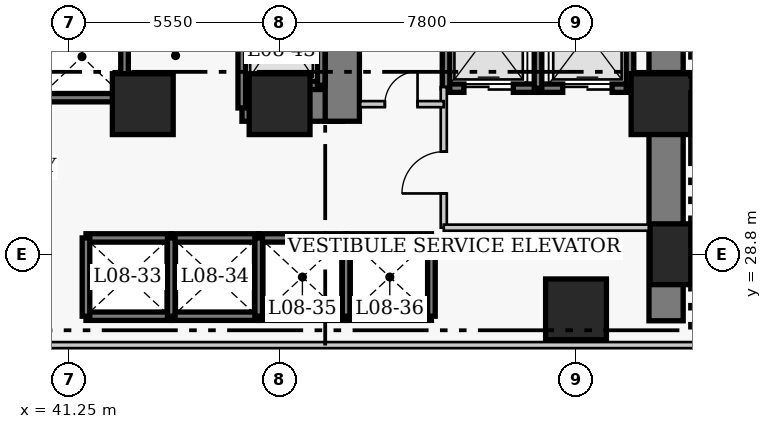
"""IFC4 building model, lengths in metres.
Left out: names, types, materials, properties, quantities, classifications, styles, units other than length and angle.
Written with IfcOpenShell. Run it as: python <this file> out.ifc"""

import sys

from ifc_helpers import new_model, si_unit, direction, frame, frame_2d, origin, origin_2d, place, context, subcontext, project, spatial, rectangle, extrude, element, fill, save


model = new_model("IFC4")
c1 = context("Model", 3, precision=1e-05, world=origin(), true_north=direction((0.0, 1.0)))
c2 = subcontext(c1, "Body", "Model", "MODEL_VIEW")
j1 = project(units=[si_unit("LENGTHUNIT", "METRE"), si_unit("PLANEANGLEUNIT", "RADIAN")], contexts=[c1])
p1 = place(None, origin())
s1 = spatial("IfcSite", under=j1, at=p1, CompositionType="ELEMENT")
p2 = place(p1, origin())
s2 = spatial("IfcBuilding", under=s1, at=p2, CompositionType="ELEMENT")
p3 = place(p2, frame((0.0, 0.0, 37.4)))
s3 = spatial("IfcBuildingStorey", under=s2, at=p3, CompositionType="ELEMENT", Elevation=37.4)
p4 = place(p3, frame((56.97, 27.05, 0.0), z_axis=(0.0, 0.0, 1.0), x_axis=(0.0, 1.0, 0.0)))
e1 = element("IfcWall", 1, at=p4, inside=s3, PredefinedType="SHEAR", context=c2, shape_type="SweptSolid", body=[
    extrude(rectangle(XDim=13.72, YDim=0.9, at=frame_2d((6.86, 0.0))), origin(), (0.0, 0.0, 1.0), 3.8),
])
p5 = place(p3, frame((45.81, 32.75, 0.0), z_axis=(0.0, 0.0, 1.0), x_axis=(1.0, 0.0, 0.0)))
e2 = element("IfcWall", 2, at=p5, inside=s3, PredefinedType="SHEAR", context=c2, shape_type="SweptSolid", body=[
    extrude(rectangle(XDim=2.64, YDim=0.9, at=frame_2d((1.32, 0.0))), origin(), (0.0, 0.0, 1.0), 3.8),
])
p6 = place(p3, frame((48.45, 32.3, 0.0), z_axis=(0.0, 0.0, 1.0), x_axis=(0.0, 1.0, 0.0)))
e3 = element("IfcWall", 3, at=p6, inside=s3, PredefinedType="SHEAR", context=c2, shape_type="SweptSolid", body=[
    extrude(rectangle(XDim=8.02, YDim=0.9, at=frame_2d((4.01, 0.0))), origin(), (0.0, 0.0, 1.0), 3.8),
])
p7 = place(p6, frame((5.9, 0.0, 0.0)))
e4 = element("IfcOpeningElement", 4, at=p7, cuts=e3, PredefinedType="OPENING", context=c2, shape_type="SweptSolid", body=[
    extrude(rectangle(XDim=1.1, YDim=2.15, at=frame_2d((0.55, 1.075))), frame((0.0, 0.46, 0.0), z_axis=(0.0, -1.0, 0.0), x_axis=(1.0, 0.0, 0.0)), (0.0, 0.0, 1.0), 0.92),
])
for number, where, z_axis, x_axis in (
    (5, (57.35, 28.8, 0.0), (0.0, 0.0, 1.0), (1.0, 0.0, 0.0)),
    (6, (43.2, 32.75, 0.0), (0.0, 0.0, 1.0), (1.0, 0.0, 0.0)),
    (7, (46.8, 32.75, 0.0), (0.0, 0.0, 1.0), (1.0, 0.0, 0.0)),
    (8, (54.6, 27.35, 0.0), (0.0, 0.0, 1.0), (1.0, 0.0, 0.0)),
    (9, (56.85, 32.75, 0.0), (0.0, 0.0, 1.0), (1.0, 0.0, 0.0)),
):
    element("IfcColumn", number, at=place(p3, frame(where, z_axis=z_axis, x_axis=x_axis)), inside=s3, PredefinedType="COLUMN", context=c2, shape_type="SweptSolid", body=[
        extrude(rectangle(XDim=1.6, YDim=1.6, at=origin_2d()), origin(), (0.0, 0.0, 1.0), 3.8),
    ])
for number, where, z_axis, x_axis in (
    (10, (41.705, 29.23, 0.0), (0.0, 0.0, 1.0), (1.0, 0.0, 0.0)),
    (11, (41.705, 27.17, 0.0), (0.0, 0.0, 1.0), (1.0, 0.0, 0.0)),
):
    element("IfcWall", number, at=place(p3, frame(where, z_axis=z_axis, x_axis=x_axis)), inside=s3, PredefinedType="SHEAR", context=c2, shape_type="SweptSolid", body=[
        extrude(rectangle(XDim=2.245, YDim=0.22, at=frame_2d((1.123, 0.0))), origin(), (0.0, 0.0, 1.0), 3.8),
    ])
p8 = place(p3, frame((41.705, 27.17, 0.0), z_axis=(0.0, 0.0, 1.0), x_axis=(0.0, 1.0, 0.0)))
e12 = element("IfcWall", 12, at=p8, inside=s3, PredefinedType="SHEAR", context=c2, shape_type="SweptSolid", body=[
    extrude(rectangle(XDim=2.06, YDim=0.2, at=frame_2d((1.03, 0.0))), origin(), (0.0, 0.0, 1.0), 3.8),
])
for number, where, z_axis, x_axis in (
    (13, (43.95, 29.23, 0.0), (0.0, 0.0, 1.0), (1.0, 0.0, 0.0)),
    (14, (43.95, 27.17, 0.0), (0.0, 0.0, 1.0), (1.0, 0.0, 0.0)),
):
    element("IfcWall", number, at=place(p3, frame(where, z_axis=z_axis, x_axis=x_axis)), inside=s3, PredefinedType="SHEAR", context=c2, shape_type="SweptSolid", body=[
        extrude(rectangle(XDim=2.3, YDim=0.22, at=frame_2d((1.15, 0.0))), origin(), (0.0, 0.0, 1.0), 3.8),
    ])
p9 = place(p3, frame((43.95, 27.17, 0.0), z_axis=(0.0, 0.0, 1.0), x_axis=(0.0, 1.0, 0.0)))
e15 = element("IfcWall", 15, at=p9, inside=s3, PredefinedType="SHEAR", context=c2, shape_type="SweptSolid", body=[
    extrude(rectangle(XDim=2.06, YDim=0.2, at=frame_2d((1.03, 0.0))), origin(), (0.0, 0.0, 1.0), 3.8),
])
for number, where, z_axis, x_axis in (
    (16, (46.25, 29.23, 0.0), (0.0, 0.0, 1.0), (1.0, 0.0, 0.0)),
    (17, (46.25, 27.17, 0.0), (0.0, 0.0, 1.0), (1.0, 0.0, 0.0)),
):
    element("IfcWall", number, at=place(p3, frame(where, z_axis=z_axis, x_axis=x_axis)), inside=s3, PredefinedType="SHEAR", context=c2, shape_type="SweptSolid", body=[
        extrude(rectangle(XDim=2.3, YDim=0.22, at=frame_2d((1.15, 0.0))), origin(), (0.0, 0.0, 1.0), 3.8),
    ])
p10 = place(p3, frame((46.25, 27.17, 0.0), z_axis=(0.0, 0.0, 1.0), x_axis=(0.0, 1.0, 0.0)))
e18 = element("IfcWall", 18, at=p10, inside=s3, PredefinedType="SHEAR", context=c2, shape_type="SweptSolid", body=[
    extrude(rectangle(XDim=2.06, YDim=0.2, at=frame_2d((1.03, 0.0))), origin(), (0.0, 0.0, 1.0), 3.8),
])
for number, where, z_axis, x_axis in (
    (19, (48.55, 29.23, 0.0), (0.0, 0.0, 1.0), (1.0, 0.0, 0.0)),
    (20, (48.55, 27.17, 0.0), (0.0, 0.0, 1.0), (1.0, 0.0, 0.0)),
):
    element("IfcWall", number, at=place(p3, frame(where, z_axis=z_axis, x_axis=x_axis)), inside=s3, PredefinedType="SHEAR", context=c2, shape_type="SweptSolid", body=[
        extrude(rectangle(XDim=2.245, YDim=0.22, at=frame_2d((1.123, 0.0))), origin(), (0.0, 0.0, 1.0), 3.8),
    ])
for number, where, z_axis, x_axis in (
    (21, (48.55, 27.17, 0.0), (0.0, 0.0, 1.0), (0.0, 1.0, 0.0)),
    (22, (50.795, 27.17, 0.0), (0.0, 0.0, 1.0), (0.0, 1.0, 0.0)),
):
    element("IfcWall", number, at=place(p3, frame(where, z_axis=z_axis, x_axis=x_axis)), inside=s3, PredefinedType="SHEAR", context=c2, shape_type="SweptSolid", body=[
        extrude(rectangle(XDim=2.06, YDim=0.2, at=frame_2d((1.03, 0.0))), origin(), (0.0, 0.0, 1.0), 3.8),
    ])
p11 = place(p3, frame((40.4, 32.92, 0.0), z_axis=(0.0, 0.0, 1.0), x_axis=(1.0, 0.0, 0.0)))
e23 = element("IfcWall", 23, at=p11, inside=s3, PredefinedType="SHEAR", context=c2, shape_type="SweptSolid", body=[
    extrude(rectangle(XDim=2.32, YDim=0.22, at=frame_2d((1.16, 0.0))), origin(), (0.0, 0.0, 1.0), 3.8),
])
p12 = place(p3, frame((42.72, 32.92, 0.0), z_axis=(0.0, 0.0, 1.0), x_axis=(0.0, 1.0, 0.0)))
e24 = element("IfcWall", 24, at=p12, inside=s3, PredefinedType="SHEAR", context=c2, shape_type="SweptSolid", body=[
    extrude(rectangle(XDim=2.16, YDim=0.2, at=frame_2d((1.08, 0.0))), origin(), (0.0, 0.0, 1.0), 3.8),
])
p13 = place(p3, frame((51.18, 33.17, 0.0), z_axis=(0.0, 0.0, 1.0), x_axis=(1.0, 0.0, 0.0)))
e25 = element("IfcWall", 25, at=p13, inside=s3, PredefinedType="SHEAR", context=c2, shape_type="SweptSolid", body=[
    extrude(rectangle(XDim=2.42, YDim=0.22, at=frame_2d((1.21, 0.0))), origin(), (0.0, 0.0, 1.0), 3.8),
])
p14 = place(p13, frame((0.47, 0.0, 0.0)))
e26 = element("IfcOpeningElement", 26, at=p14, cuts=e25, PredefinedType="OPENING", context=c2, shape_type="SweptSolid", body=[
    extrude(rectangle(XDim=1.3, YDim=2.15, at=frame_2d((0.65, 1.075))), frame((0.0, 0.12, 0.0), z_axis=(0.0, -1.0, 0.0), x_axis=(1.0, 0.0, 0.0)), (0.0, 0.0, 1.0), 0.24),
])
p15 = place(p3, frame((51.18, 33.17, 0.0), z_axis=(0.0, 0.0, 1.0), x_axis=(0.0, 1.0, 0.0)))
e27 = element("IfcWall", 27, at=p15, inside=s3, PredefinedType="SHEAR", context=c2, shape_type="SweptSolid", body=[
    extrude(rectangle(XDim=2.86, YDim=0.2, at=frame_2d((1.43, 0.0))), origin(), (0.0, 0.0, 1.0), 3.8),
])
p16 = place(p3, frame((53.6, 33.17, 0.0), z_axis=(0.0, 0.0, 1.0), x_axis=(1.0, 0.0, 0.0)))
e28 = element("IfcWall", 28, at=p16, inside=s3, PredefinedType="SHEAR", context=c2, shape_type="SweptSolid", body=[
    extrude(rectangle(XDim=2.42, YDim=0.22, at=frame_2d((1.21, 0.0))), origin(), (0.0, 0.0, 1.0), 3.8),
])
p17 = place(p16, frame((0.65, 0.0, 0.0)))
e29 = element("IfcOpeningElement", 29, at=p17, cuts=e28, PredefinedType="OPENING", context=c2, shape_type="SweptSolid", body=[
    extrude(rectangle(XDim=1.3, YDim=2.15, at=frame_2d((0.65, 1.075))), frame((0.0, 0.12, 0.0), z_axis=(0.0, -1.0, 0.0), x_axis=(1.0, 0.0, 0.0)), (0.0, 0.0, 1.0), 0.24),
])
for number, where, z_axis, x_axis in (
    (30, (53.6, 33.17, 0.0), (0.0, 0.0, 1.0), (0.0, 1.0, 0.0)),
    (31, (56.02, 33.17, 0.0), (0.0, 0.0, 1.0), (0.0, 1.0, 0.0)),
):
    element("IfcWall", number, at=place(p3, frame(where, z_axis=z_axis, x_axis=x_axis)), inside=s3, PredefinedType="SHEAR", context=c2, shape_type="SweptSolid", body=[
        extrude(rectangle(XDim=2.86, YDim=0.2, at=frame_2d((1.43, 0.0))), origin(), (0.0, 0.0, 1.0), 3.8),
    ])
p18 = place(p3, frame((45.805, 33.245, 0.0), z_axis=(0.0, 0.0, 1.0), x_axis=(1.0, 0.0, 0.0)))
e32 = element("IfcWall", 32, at=p18, inside=s3, PredefinedType="SHEAR", context=c2, shape_type="SweptSolid", body=[
    extrude(rectangle(XDim=2.09, YDim=0.22, at=frame_2d((1.045, 0.0))), origin(), (0.0, 0.0, 1.0), 3.8),
])
p19 = place(p3, frame((45.805, 32.65, 0.0), z_axis=(0.0, 0.0, 1.0), x_axis=(0.0, 1.0, 0.0)))
e33 = element("IfcWall", 33, at=p19, inside=s3, PredefinedType="SHEAR", context=c2, shape_type="SweptSolid", body=[
    extrude(rectangle(XDim=3.505, YDim=0.2, at=frame_2d((1.752, 0.0))), origin(), (0.0, 0.0, 1.0), 3.8),
])
p20 = place(p3, frame((47.895, 33.245, 0.0), z_axis=(0.0, 0.0, 1.0), x_axis=(0.0, 1.0, 0.0)))
e34 = element("IfcWall", 34, at=p20, inside=s3, PredefinedType="SHEAR", context=c2, shape_type="SweptSolid", body=[
    extrude(rectangle(XDim=2.91, YDim=0.2, at=frame_2d((1.455, 0.0))), origin(), (0.0, 0.0, 1.0), 3.8),
])
p21 = place(p3, frame((51.12, 29.5, 0.0), z_axis=(0.0, 0.0, 1.0), x_axis=(0.0, 1.0, 0.0)))
e35 = element("IfcWall", 35, at=p21, inside=s3, PredefinedType="PARTITIONING", context=c2, shape_type="SweptSolid", body=[
    extrude(rectangle(XDim=3.7, YDim=0.16, at=frame_2d((1.85, 0.0))), origin(), (0.0, 0.0, 1.0), 3.54),
])
p22 = place(p21, frame((0.9, 0.0, 0.0)))
e36 = element("IfcOpeningElement", 36, at=p22, cuts=e35, PredefinedType="OPENING", context=c2, shape_type="SweptSolid", body=[
    extrude(rectangle(XDim=1.1, YDim=2.15, at=frame_2d((0.55, 1.075))), frame((0.0, 0.09, 0.0), z_axis=(0.0, -1.0, 0.0), x_axis=(1.0, 0.0, 0.0)), (0.0, 0.0, 1.0), 0.18),
])
p23 = place(p3, frame((51.12, 29.5, 0.0), z_axis=(0.0, 0.0, 1.0), x_axis=(1.0, 0.0, 0.0)))
e37 = element("IfcWall", 37, at=p23, inside=s3, PredefinedType="PARTITIONING", context=c2, shape_type="SweptSolid", body=[
    extrude(rectangle(XDim=5.63, YDim=0.16, at=frame_2d((2.815, 0.0))), origin(), (0.0, 0.0, 1.0), 3.54),
])
p24 = place(p3, frame((48.92, 32.75, 0.0), z_axis=(0.0, 0.0, 1.0), x_axis=(1.0, 0.0, 0.0)))
e38 = element("IfcWall", 38, at=p24, inside=s3, PredefinedType="PARTITIONING", context=c2, shape_type="SweptSolid", body=[
    extrude(rectangle(XDim=2.2, YDim=0.16, at=frame_2d((1.1, 0.0))), origin(), (0.0, 0.0, 1.0), 3.54),
])
p25 = place(p24, frame((0.65, 0.0, 0.0)))
e39 = element("IfcOpeningElement", 39, at=p25, cuts=e38, PredefinedType="OPENING", context=c2, shape_type="SweptSolid", body=[
    extrude(rectangle(XDim=0.86, YDim=2.05, at=frame_2d((0.43, 1.025))), frame((0.0, 0.09, 0.0), z_axis=(0.0, -1.0, 0.0), x_axis=(1.0, 0.0, 0.0)), (0.0, 0.0, 1.0), 0.18),
])
p26 = place(p3, frame((35.85, 26.41, 0.0), z_axis=(0.0, 0.0, 1.0), x_axis=(1.0, 0.0, 0.0)))
e40 = element("IfcWall", 40, at=p26, inside=s3, PredefinedType="PARTITIONING", context=c2, shape_type="SweptSolid", body=[
    extrude(rectangle(XDim=22.8, YDim=0.16, at=frame_2d((11.4, 0.0))), origin(), (0.0, 0.0, 1.0), 3.54),
])
p27 = place(p14, origin())
e41 = element("IfcDoor", 41, at=p27, inside=s3, OperationType="DOUBLE_DOOR_SLIDING", PredefinedType="DOOR", context=c2, shape_type="SweptSolid", body=[
    extrude(rectangle(XDim=1.3, YDim=2.15, at=frame_2d((0.65, 1.075))), frame((0.0, 0.025, 0.0), z_axis=(0.0, -1.0, 0.0), x_axis=(1.0, 0.0, 0.0)), (0.0, 0.0, 1.0), 0.05),
])
fill(e26, e41)
p28 = place(p17, origin())
e42 = element("IfcDoor", 42, at=p28, inside=s3, OperationType="DOUBLE_DOOR_SLIDING", PredefinedType="DOOR", context=c2, shape_type="SweptSolid", body=[
    extrude(rectangle(XDim=1.3, YDim=2.15, at=frame_2d((0.65, 1.075))), frame((0.0, 0.025, 0.0), z_axis=(0.0, -1.0, 0.0), x_axis=(1.0, 0.0, 0.0)), (0.0, 0.0, 1.0), 0.05),
])
fill(e29, e42)
p29 = place(p22, origin())
e43 = element("IfcDoor", 43, at=p29, inside=s3, OperationType="SINGLE_SWING_LEFT", PredefinedType="DOOR", context=c2, shape_type="SweptSolid", body=[
    extrude(rectangle(XDim=1.1, YDim=2.15, at=frame_2d((0.55, 1.075))), frame((0.0, 0.025, 0.0), z_axis=(0.0, -1.0, 0.0), x_axis=(1.0, 0.0, 0.0)), (0.0, 0.0, 1.0), 0.05),
])
fill(e36, e43)
p30 = place(p25, origin())
e44 = element("IfcDoor", 44, at=p30, inside=s3, OperationType="SINGLE_SWING_RIGHT", PredefinedType="DOOR", context=c2, shape_type="SweptSolid", body=[
    extrude(rectangle(XDim=0.86, YDim=2.05, at=frame_2d((0.43, 1.025))), frame((0.0, 0.025, 0.0), z_axis=(0.0, -1.0, 0.0), x_axis=(1.0, 0.0, 0.0)), (0.0, 0.0, 1.0), 0.05),
])
fill(e39, e44)
save(model, sys.argv[1])
